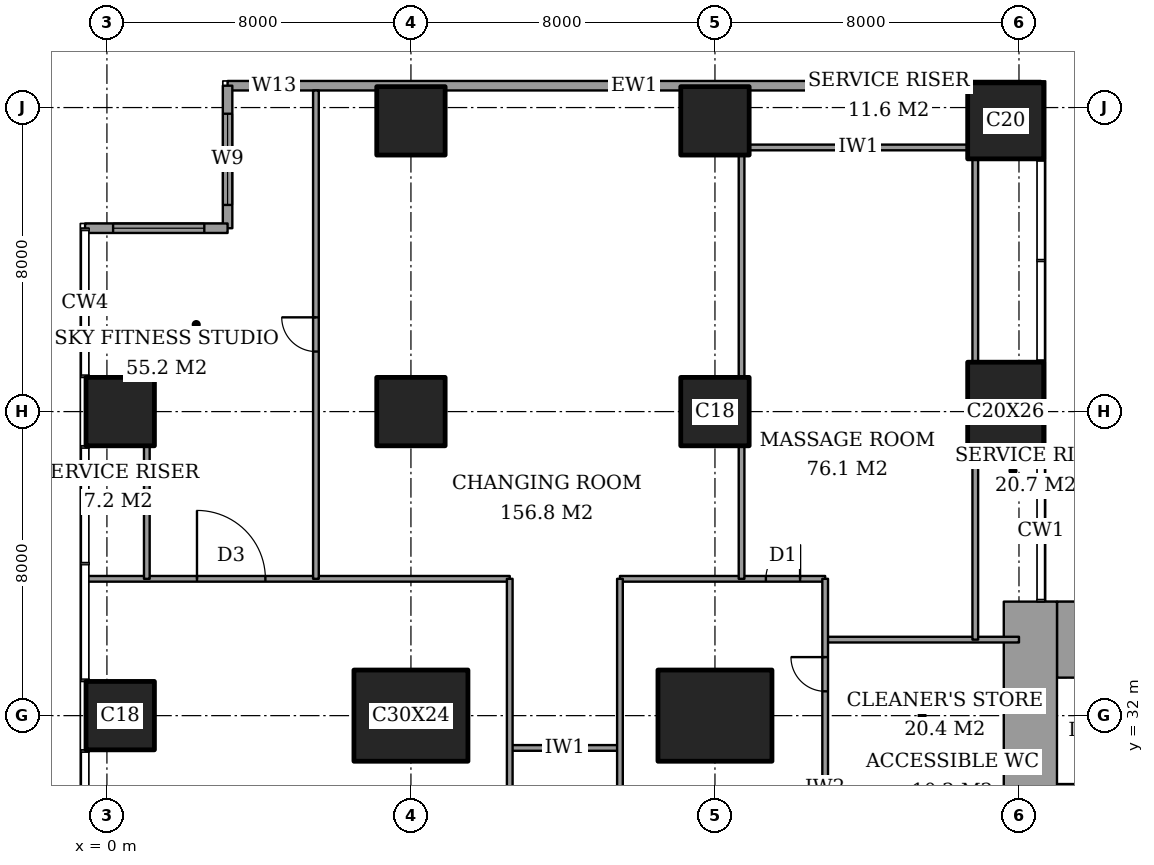
"""IFC4 building model, lengths in metres.
Left out: names, types, materials, properties, quantities, classifications, styles, units other than length and angle.
Written with IfcOpenShell. Run it as: python <this file> out.ifc"""

import sys

from ifc_helpers import new_model, si_unit, direction, frame, frame_2d, origin, origin_2d, place, context, subcontext, project, spatial, rectangle, extrude, element, fill, save


model = new_model("IFC4")
c1 = context("Model", 3, precision=1e-05, world=origin(), true_north=direction((0.0, 1.0)))
c2 = subcontext(c1, "Body", "Model", "MODEL_VIEW")
j1 = project(units=[si_unit("LENGTHUNIT", "METRE"), si_unit("PLANEANGLEUNIT", "RADIAN")], contexts=[c1])
p1 = place(None, origin())
s1 = spatial("IfcSite", under=j1, at=p1, CompositionType="ELEMENT")
p2 = place(p1, origin())
s2 = spatial("IfcBuilding", under=s1, at=p2, CompositionType="ELEMENT")
p3 = place(p2, frame((0.0, 0.0, 200.2)))
s3 = spatial("IfcBuildingStorey", under=s2, at=p3, CompositionType="ELEMENT", Elevation=200.2)
for number, where, z_axis, x_axis in (
    (1, (0.35, 32.0, 0.0), (0.0, 0.0, 1.0), (1.0, 0.0, 0.0)),
    (2, (0.35, 40.0, 0.0), (0.0, 0.0, 1.0), (1.0, 0.0, 0.0)),
):
    element("IfcColumn", number, at=place(p3, frame(where, z_axis=z_axis, x_axis=x_axis)), inside=s3, PredefinedType="COLUMN", context=c2, shape_type="SweptSolid", body=[
        extrude(rectangle(XDim=1.8, YDim=1.8, at=origin_2d()), origin(), (0.0, 0.0, 1.0), 3.6),
    ])
p4 = place(p3, frame((8.0, 32.0, 0.0), z_axis=(0.0, 0.0, 1.0), x_axis=(1.0, 0.0, 0.0)))
e3 = element("IfcColumn", 3, at=p4, inside=s3, PredefinedType="COLUMN", context=c2, shape_type="SweptSolid", body=[
    extrude(rectangle(XDim=3.0, YDim=2.4, at=origin_2d()), origin(), (0.0, 0.0, 1.0), 3.6),
])
for number, where, z_axis, x_axis in (
    (4, (8.0, 40.0, 0.0), (0.0, 0.0, 1.0), (1.0, 0.0, 0.0)),
    (5, (8.0, 47.65, 0.0), (0.0, 0.0, 1.0), (1.0, 0.0, 0.0)),
):
    element("IfcColumn", number, at=place(p3, frame(where, z_axis=z_axis, x_axis=x_axis)), inside=s3, PredefinedType="COLUMN", context=c2, shape_type="SweptSolid", body=[
        extrude(rectangle(XDim=1.8, YDim=1.8, at=origin_2d()), origin(), (0.0, 0.0, 1.0), 3.6),
    ])
p5 = place(p3, frame((16.0, 32.0, 0.0), z_axis=(0.0, 0.0, 1.0), x_axis=(1.0, 0.0, 0.0)))
e6 = element("IfcColumn", 6, at=p5, inside=s3, PredefinedType="COLUMN", context=c2, shape_type="SweptSolid", body=[
    extrude(rectangle(XDim=3.0, YDim=2.4, at=origin_2d()), origin(), (0.0, 0.0, 1.0), 3.6),
])
for number, where, z_axis, x_axis in (
    (7, (16.0, 40.0, 0.0), (0.0, 0.0, 1.0), (1.0, 0.0, 0.0)),
    (8, (16.0, 47.65, 0.0), (0.0, 0.0, 1.0), (1.0, 0.0, 0.0)),
):
    element("IfcColumn", number, at=place(p3, frame(where, z_axis=z_axis, x_axis=x_axis)), inside=s3, PredefinedType="COLUMN", context=c2, shape_type="SweptSolid", body=[
        extrude(rectangle(XDim=1.8, YDim=1.8, at=origin_2d()), origin(), (0.0, 0.0, 1.0), 3.6),
    ])
p6 = place(p3, frame((23.65, 40.0, 0.0), z_axis=(0.0, 0.0, 1.0), x_axis=(1.0, 0.0, 0.0)))
e9 = element("IfcColumn", 9, at=p6, inside=s3, PredefinedType="COLUMN", context=c2, shape_type="SweptSolid", body=[
    extrude(rectangle(XDim=2.0, YDim=2.6, at=origin_2d()), origin(), (0.0, 0.0, 1.0), 3.6),
])
p7 = place(p3, frame((23.65, 47.65, 0.0), z_axis=(0.0, 0.0, 1.0), x_axis=(1.0, 0.0, 0.0)))
e10 = element("IfcColumn", 10, at=p7, inside=s3, PredefinedType="COLUMN", context=c2, shape_type="SweptSolid", body=[
    extrude(rectangle(XDim=2.0, YDim=2.0, at=origin_2d()), origin(), (0.0, 0.0, 1.0), 3.6),
])
p8 = place(p3, frame((25.0, 34.0, 0.0), z_axis=(0.0, 0.0, 1.0), x_axis=(1.0, 0.0, 0.0)))
e11 = element("IfcWall", 11, at=p8, inside=s3, PredefinedType="SHEAR", context=c2, shape_type="SweptSolid", body=[
    extrude(rectangle(XDim=3.15, YDim=2.0, at=frame_2d((1.575, 0.0))), origin(), (0.0, 0.0, 1.0), 3.6),
])
p9 = place(p3, frame((24.3, 23.15, 0.0), z_axis=(0.0, 0.0, 1.0), x_axis=(0.0, 1.0, 0.0)))
e12 = element("IfcWall", 12, at=p9, inside=s3, PredefinedType="SHEAR", context=c2, shape_type="SweptSolid", body=[
    extrude(rectangle(XDim=11.85, YDim=1.4, at=frame_2d((5.925, 0.0))), origin(), (0.0, 0.0, 1.0), 3.6),
])
p10 = place(p9, frame((0.75, 0.0, 0.0)))
e13 = element("IfcOpeningElement", 13, at=p10, cuts=e12, PredefinedType="OPENING", context=c2, shape_type="SweptSolid", body=[
    extrude(rectangle(XDim=1.8, YDim=2.4, at=frame_2d((0.9, 1.2))), frame((0.0, 0.71, 0.0), z_axis=(0.0, -1.0, 0.0), x_axis=(1.0, 0.0, 0.0)), (0.0, 0.0, 1.0), 1.42),
])
p11 = place(p3, frame((24.575, 48.575, 0.0), z_axis=(0.0, 0.0, 1.0), x_axis=(-1.0, 0.0, 0.0)))
e14 = element("IfcWall", 14, at=p11, inside=s3, PredefinedType="SOLIDWALL", context=c2, shape_type="SweptSolid", body=[
    extrude(rectangle(XDim=21.4, YDim=0.25, at=frame_2d((10.7, 0.0))), origin(), (0.0, 0.0, 1.0), 3.6),
])
p12 = place(p11, frame((19.575, 0.0, 0.2)))
e15 = element("IfcOpeningElement", 15, at=p12, cuts=e14, PredefinedType="OPENING", context=c2, shape_type="SweptSolid", body=[
    extrude(rectangle(XDim=1.2, YDim=2.4, at=frame_2d((0.6, 1.2))), frame((0.0, 0.135, 0.0), z_axis=(0.0, -1.0, 0.0), x_axis=(1.0, 0.0, 0.0)), (0.0, 0.0, 1.0), 0.27),
])
p13 = place(p3, frame((3.175, 48.575, 0.0), z_axis=(0.0, 0.0, 1.0), x_axis=(0.0, -1.0, 0.0)))
e16 = element("IfcWall", 16, at=p13, inside=s3, PredefinedType="SOLIDWALL", context=c2, shape_type="SweptSolid", body=[
    extrude(rectangle(XDim=3.75, YDim=0.25, at=frame_2d((1.875, 0.0))), origin(), (0.0, 0.0, 1.0), 3.6),
])
p14 = place(p13, frame((0.738, 0.0, 0.2)))
e17 = element("IfcOpeningElement", 17, at=p14, cuts=e16, PredefinedType="OPENING", context=c2, shape_type="SweptSolid", body=[
    extrude(rectangle(XDim=2.4, YDim=2.4, at=frame_2d((1.2, 1.2))), frame((0.0, 0.135, 0.0), z_axis=(0.0, -1.0, 0.0), x_axis=(1.0, 0.0, 0.0)), (0.0, 0.0, 1.0), 0.27),
])
p15 = place(p3, frame((3.175, 44.825, 0.0), z_axis=(0.0, 0.0, 1.0), x_axis=(-1.0, 0.0, 0.0)))
e18 = element("IfcWall", 18, at=p15, inside=s3, PredefinedType="SOLIDWALL", context=c2, shape_type="SweptSolid", body=[
    extrude(rectangle(XDim=3.75, YDim=0.25, at=frame_2d((1.875, 0.0))), origin(), (0.0, 0.0, 1.0), 3.6),
])
p16 = place(p15, frame((0.613, 0.0, 0.2)))
e19 = element("IfcOpeningElement", 19, at=p16, cuts=e18, PredefinedType="OPENING", context=c2, shape_type="SweptSolid", body=[
    extrude(rectangle(XDim=2.4, YDim=2.4, at=frame_2d((1.2, 1.2))), frame((0.0, 0.135, 0.0), z_axis=(0.0, -1.0, 0.0), x_axis=(1.0, 0.0, 0.0)), (0.0, 0.0, 1.0), 0.27),
])
p17 = place(p3, frame((10.6, 31.15, 0.0), z_axis=(0.0, 0.0, 1.0), x_axis=(1.0, 0.0, 0.0)))
e20 = element("IfcWall", 20, at=p17, inside=s3, PredefinedType="PARTITIONING", context=c2, shape_type="SweptSolid", body=[
    extrude(rectangle(XDim=2.9, YDim=0.15, at=frame_2d((1.45, 0.0))), origin(), (0.0, 0.0, 1.0), 3.35),
])
p18 = place(p3, frame((18.9, 34.0, 0.0), z_axis=(0.0, 0.0, 1.0), x_axis=(1.0, 0.0, 0.0)))
e21 = element("IfcWall", 21, at=p18, inside=s3, PredefinedType="PARTITIONING", context=c2, shape_type="SweptSolid", body=[
    extrude(rectangle(XDim=5.1, YDim=0.15, at=frame_2d((2.55, 0.0))), origin(), (0.0, 0.0, 1.0), 3.35),
])
p19 = place(p3, frame((-0.561, 35.6, 0.0), z_axis=(0.0, 0.0, 1.0), x_axis=(1.0, 0.0, 0.0)))
e22 = element("IfcWall", 22, at=p19, inside=s3, PredefinedType="PARTITIONING", context=c2, shape_type="SweptSolid", body=[
    extrude(rectangle(XDim=11.161, YDim=0.15, at=frame_2d((5.581, 0.0))), origin(), (0.0, 0.0, 1.0), 3.35),
])
p20 = place(p19, frame((2.931, 0.0, 0.0)))
e23 = element("IfcOpeningElement", 23, at=p20, cuts=e22, PredefinedType="OPENING", context=c2, shape_type="SweptSolid", body=[
    extrude(rectangle(XDim=1.8, YDim=2.1, at=frame_2d((0.9, 1.05))), frame((0.0, 0.085, 0.0), z_axis=(0.0, -1.0, 0.0), x_axis=(1.0, 0.0, 0.0)), (0.0, 0.0, 1.0), 0.17),
])
p21 = place(p3, frame((13.5, 35.6, 0.0), z_axis=(0.0, 0.0, 1.0), x_axis=(1.0, 0.0, 0.0)))
e24 = element("IfcWall", 24, at=p21, inside=s3, PredefinedType="PARTITIONING", context=c2, shape_type="SweptSolid", body=[
    extrude(rectangle(XDim=5.4, YDim=0.15, at=frame_2d((2.7, 0.0))), origin(), (0.0, 0.0, 1.0), 3.35),
])
p22 = place(p21, frame((3.84, 0.0, 0.0)))
e25 = element("IfcOpeningElement", 25, at=p22, cuts=e24, PredefinedType="OPENING", context=c2, shape_type="SweptSolid", body=[
    extrude(rectangle(XDim=0.9, YDim=2.1, at=frame_2d((0.45, 1.05))), frame((0.0, 0.085, 0.0), z_axis=(0.0, -1.0, 0.0), x_axis=(1.0, 0.0, 0.0)), (0.0, 0.0, 1.0), 0.17),
])
p23 = place(p3, frame((16.9, 46.95, 0.0), z_axis=(0.0, 0.0, 1.0), x_axis=(1.0, 0.0, 0.0)))
e26 = element("IfcWall", 26, at=p23, inside=s3, PredefinedType="PARTITIONING", context=c2, shape_type="SweptSolid", body=[
    extrude(rectangle(XDim=5.75, YDim=0.15, at=frame_2d((2.875, 0.0))), origin(), (0.0, 0.0, 1.0), 3.35),
])
p24 = place(p3, frame((1.05, 35.6, 0.0), z_axis=(0.0, 0.0, 1.0), x_axis=(0.0, 1.0, 0.0)))
e27 = element("IfcWall", 27, at=p24, inside=s3, PredefinedType="PARTITIONING", context=c2, shape_type="SweptSolid", body=[
    extrude(rectangle(XDim=3.5, YDim=0.15, at=frame_2d((1.75, 0.0))), origin(), (0.0, 0.0, 1.0), 3.35),
])
p25 = place(p3, frame((5.5, 35.6, 0.0), z_axis=(0.0, 0.0, 1.0), x_axis=(0.0, 1.0, 0.0)))
e28 = element("IfcWall", 28, at=p25, inside=s3, PredefinedType="PARTITIONING", context=c2, shape_type="SweptSolid", body=[
    extrude(rectangle(XDim=12.85, YDim=0.15, at=frame_2d((6.425, 0.0))), origin(), (0.0, 0.0, 1.0), 3.35),
])
p26 = place(p25, frame((5.98, 0.0, 0.0)))
e29 = element("IfcOpeningElement", 29, at=p26, cuts=e28, PredefinedType="OPENING", context=c2, shape_type="SweptSolid", body=[
    extrude(rectangle(XDim=0.9, YDim=2.1, at=frame_2d((0.45, 1.05))), frame((0.0, 0.085, 0.0), z_axis=(0.0, -1.0, 0.0), x_axis=(1.0, 0.0, 0.0)), (0.0, 0.0, 1.0), 0.17),
])
p27 = place(p3, frame((10.6, 12.4, 0.0), z_axis=(0.0, 0.0, 1.0), x_axis=(0.0, 1.0, 0.0)))
e30 = element("IfcWall", 30, at=p27, inside=s3, PredefinedType="PARTITIONING", context=c2, shape_type="SweptSolid", body=[
    extrude(rectangle(XDim=23.2, YDim=0.15, at=frame_2d((11.6, 0.0))), origin(), (0.0, 0.0, 1.0), 3.35),
])
p28 = place(p27, frame((11.09, 0.0, 0.0)))
e31 = element("IfcOpeningElement", 31, at=p28, cuts=e30, PredefinedType="OPENING", context=c2, shape_type="SweptSolid", body=[
    extrude(rectangle(XDim=1.0, YDim=2.1, at=frame_2d((0.5, 1.05))), frame((0.0, 0.085, 0.0), z_axis=(0.0, -1.0, 0.0), x_axis=(1.0, 0.0, 0.0)), (0.0, 0.0, 1.0), 0.17),
])
p29 = place(p3, frame((13.5, 12.4, 0.0), z_axis=(0.0, 0.0, 1.0), x_axis=(0.0, 1.0, 0.0)))
e32 = element("IfcWall", 32, at=p29, inside=s3, PredefinedType="PARTITIONING", context=c2, shape_type="SweptSolid", body=[
    extrude(rectangle(XDim=23.2, YDim=0.15, at=frame_2d((11.6, 0.0))), origin(), (0.0, 0.0, 1.0), 3.35),
])
p30 = place(p29, frame((11.15, 0.0, 0.0)))
e33 = element("IfcOpeningElement", 33, at=p30, cuts=e32, PredefinedType="OPENING", context=c2, shape_type="SweptSolid", body=[
    extrude(rectangle(XDim=0.9, YDim=2.1, at=frame_2d((0.45, 1.05))), frame((0.0, 0.085, 0.0), z_axis=(0.0, -1.0, 0.0), x_axis=(1.0, 0.0, 0.0)), (0.0, 0.0, 1.0), 0.17),
])
p31 = place(p3, frame((16.7, 35.6, 0.0), z_axis=(0.0, 0.0, 1.0), x_axis=(0.0, 1.0, 0.0)))
e34 = element("IfcWall", 34, at=p31, inside=s3, PredefinedType="PARTITIONING", context=c2, shape_type="SweptSolid", body=[
    extrude(rectangle(XDim=3.5, YDim=0.15, at=frame_2d((1.75, 0.0))), origin(), (0.0, 0.0, 1.0), 3.35),
])
p32 = place(p3, frame((16.7, 40.9, 0.0), z_axis=(0.0, 0.0, 1.0), x_axis=(0.0, 1.0, 0.0)))
e35 = element("IfcWall", 35, at=p32, inside=s3, PredefinedType="PARTITIONING", context=c2, shape_type="SweptSolid", body=[
    extrude(rectangle(XDim=5.85, YDim=0.15, at=frame_2d((2.925, 0.0))), origin(), (0.0, 0.0, 1.0), 3.35),
])
p33 = place(p3, frame((18.9, 30.0, 0.0), z_axis=(0.0, 0.0, 1.0), x_axis=(0.0, 1.0, 0.0)))
e36 = element("IfcWall", 36, at=p33, inside=s3, PredefinedType="PARTITIONING", context=c2, shape_type="SweptSolid", body=[
    extrude(rectangle(XDim=5.6, YDim=0.15, at=frame_2d((2.8, 0.0))), origin(), (0.0, 0.0, 1.0), 3.35),
])
p34 = place(p33, frame((2.64, 0.0, 0.0)))
e37 = element("IfcOpeningElement", 37, at=p34, cuts=e36, PredefinedType="OPENING", context=c2, shape_type="SweptSolid", body=[
    extrude(rectangle(XDim=0.9, YDim=2.1, at=frame_2d((0.45, 1.05))), frame((0.0, 0.085, 0.0), z_axis=(0.0, -1.0, 0.0), x_axis=(1.0, 0.0, 0.0)), (0.0, 0.0, 1.0), 0.17),
])
p35 = place(p3, frame((22.85, 34.0, 0.0), z_axis=(0.0, 0.0, 1.0), x_axis=(0.0, 1.0, 0.0)))
e38 = element("IfcWall", 38, at=p35, inside=s3, PredefinedType="PARTITIONING", context=c2, shape_type="SweptSolid", body=[
    extrude(rectangle(XDim=4.7, YDim=0.15, at=frame_2d((2.35, 0.0))), origin(), (0.0, 0.0, 1.0), 3.35),
])
p36 = place(p3, frame((22.85, 41.3, 0.0), z_axis=(0.0, 0.0, 1.0), x_axis=(0.0, 1.0, 0.0)))
e39 = element("IfcWall", 39, at=p36, inside=s3, PredefinedType="PARTITIONING", context=c2, shape_type="SweptSolid", body=[
    extrude(rectangle(XDim=5.35, YDim=0.15, at=frame_2d((2.675, 0.0))), origin(), (0.0, 0.0, 1.0), 3.35),
])
p37 = place(p3, frame((25.0, 30.1, 0.0), z_axis=(0.0, 0.0, 1.0), x_axis=(1.0, 0.0, 0.0)))
e40 = element("IfcWall", 40, at=p37, inside=s3, PredefinedType="PARTITIONING", context=c2, shape_type="SweptSolid", body=[
    extrude(rectangle(XDim=12.7, YDim=0.2, at=frame_2d((6.35, 0.0))), origin(), (0.0, 0.0, 1.0), 3.6),
])
p38 = place(p37, frame((4.25, 0.0, 0.0)))
e41 = element("IfcOpeningElement", 41, at=p38, cuts=e40, PredefinedType="OPENING", context=c2, shape_type="SweptSolid", body=[
    extrude(rectangle(XDim=1.1, YDim=2.1, at=frame_2d((0.55, 1.05))), frame((0.0, 0.11, 0.0), z_axis=(0.0, -1.0, 0.0), x_axis=(1.0, 0.0, 0.0)), (0.0, 0.0, 1.0), 0.22),
])
p39 = place(p37, frame((7.45, 0.0, 0.0)))
e42 = element("IfcOpeningElement", 42, at=p39, cuts=e40, PredefinedType="OPENING", context=c2, shape_type="SweptSolid", body=[
    extrude(rectangle(XDim=1.1, YDim=2.1, at=frame_2d((0.55, 1.05))), frame((0.0, 0.11, 0.0), z_axis=(0.0, -1.0, 0.0), x_axis=(1.0, 0.0, 0.0)), (0.0, 0.0, 1.0), 0.22),
])
p40 = place(p37, frame((10.65, 0.0, 0.0)))
e43 = element("IfcOpeningElement", 43, at=p40, cuts=e40, PredefinedType="OPENING", context=c2, shape_type="SweptSolid", body=[
    extrude(rectangle(XDim=1.1, YDim=2.1, at=frame_2d((0.55, 1.05))), frame((0.0, 0.11, 0.0), z_axis=(0.0, -1.0, 0.0), x_axis=(1.0, 0.0, 0.0)), (0.0, 0.0, 1.0), 0.22),
])
p41 = place(p37, frame((0.9, 0.0, 0.0)))
e44 = element("IfcOpeningElement", 44, at=p41, cuts=e40, PredefinedType="OPENING", context=c2, shape_type="SweptSolid", body=[
    extrude(rectangle(XDim=1.2, YDim=2.1, at=frame_2d((0.6, 1.05))), frame((0.0, 0.11, 0.0), z_axis=(0.0, -1.0, 0.0), x_axis=(1.0, 0.0, 0.0)), (0.0, 0.0, 1.0), 0.22),
])
p42 = place(p12, origin())
e45 = element("IfcWindow", 45, at=p42, inside=s3, PartitioningType="SINGLE_PANEL", PredefinedType="WINDOW", context=c2, shape_type="SweptSolid", body=[
    extrude(rectangle(XDim=1.2, YDim=2.4, at=frame_2d((0.6, 1.2))), frame((0.0, 0.03, 0.0), z_axis=(0.0, -1.0, 0.0), x_axis=(1.0, 0.0, 0.0)), (0.0, 0.0, 1.0), 0.06),
])
fill(e15, e45)
p43 = place(p14, origin())
e46 = element("IfcWindow", 46, at=p43, inside=s3, PartitioningType="SINGLE_PANEL", PredefinedType="WINDOW", context=c2, shape_type="SweptSolid", body=[
    extrude(rectangle(XDim=2.4, YDim=2.4, at=frame_2d((1.2, 1.2))), frame((0.0, 0.03, 0.0), z_axis=(0.0, -1.0, 0.0), x_axis=(1.0, 0.0, 0.0)), (0.0, 0.0, 1.0), 0.06),
])
fill(e17, e46)
p44 = place(p16, origin())
e47 = element("IfcWindow", 47, at=p44, inside=s3, PartitioningType="SINGLE_PANEL", PredefinedType="WINDOW", context=c2, shape_type="SweptSolid", body=[
    extrude(rectangle(XDim=2.4, YDim=2.4, at=frame_2d((1.2, 1.2))), frame((0.0, 0.03, 0.0), z_axis=(0.0, -1.0, 0.0), x_axis=(1.0, 0.0, 0.0)), (0.0, 0.0, 1.0), 0.06),
])
fill(e19, e47)
p45 = place(p34, origin())
e48 = element("IfcDoor", 48, at=p45, inside=s3, OperationType="SINGLE_SWING_LEFT", PredefinedType="DOOR", context=c2, shape_type="SweptSolid", body=[
    extrude(rectangle(XDim=0.9, YDim=2.1, at=frame_2d((0.45, 1.05))), frame((0.0, 0.025, 0.0), z_axis=(0.0, -1.0, 0.0), x_axis=(1.0, 0.0, 0.0)), (0.0, 0.0, 1.0), 0.05),
])
fill(e37, e48)
p46 = place(p20, origin())
e49 = element("IfcDoor", 49, at=p46, inside=s3, OperationType="DOUBLE_DOOR_DOUBLE_SWING", PredefinedType="DOOR", context=c2, shape_type="SweptSolid", body=[
    extrude(rectangle(XDim=1.8, YDim=2.1, at=frame_2d((0.9, 1.05))), frame((0.0, 0.025, 0.0), z_axis=(0.0, -1.0, 0.0), x_axis=(1.0, 0.0, 0.0)), (0.0, 0.0, 1.0), 0.05),
])
fill(e23, e49)
p47 = place(p26, origin())
e50 = element("IfcDoor", 50, at=p47, inside=s3, OperationType="SINGLE_SWING_LEFT", PredefinedType="DOOR", context=c2, shape_type="SweptSolid", body=[
    extrude(rectangle(XDim=0.9, YDim=2.1, at=frame_2d((0.45, 1.05))), frame((0.0, 0.025, 0.0), z_axis=(0.0, -1.0, 0.0), x_axis=(1.0, 0.0, 0.0)), (0.0, 0.0, 1.0), 0.05),
])
fill(e29, e50)
p48 = place(p22, origin())
e51 = element("IfcDoor", 51, at=p48, inside=s3, OperationType="SINGLE_SWING_LEFT", PredefinedType="DOOR", context=c2, shape_type="SweptSolid", body=[
    extrude(rectangle(XDim=0.9, YDim=2.1, at=frame_2d((0.45, 1.05))), frame((0.0, 0.025, 0.0), z_axis=(0.0, -1.0, 0.0), x_axis=(1.0, 0.0, 0.0)), (0.0, 0.0, 1.0), 0.05),
])
fill(e25, e51)
save(model, sys.argv[1])
